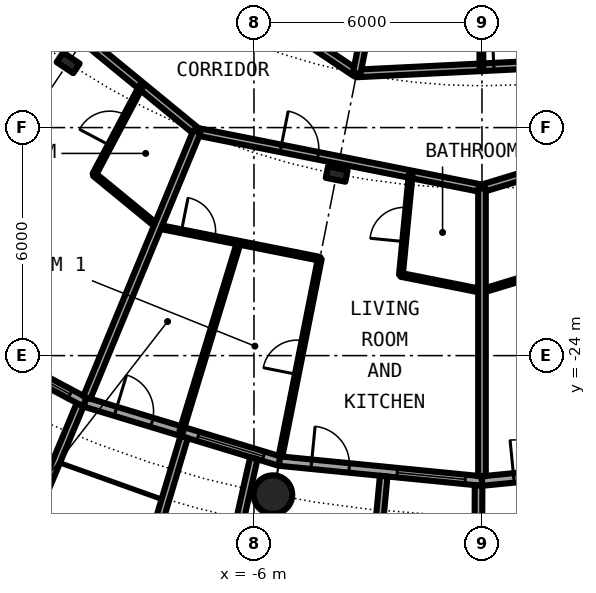
"""IFC4 building model, lengths in metres.
Left out: names, types, materials, properties, quantities, classifications, styles, units other than length and angle.
Written with IfcOpenShell. Run it as: python <this file> out.ifc"""

import sys

from ifc_helpers import new_model, si_unit, direction, frame, frame_2d, origin, origin_2d, place, context, subcontext, project, spatial, rectangle, hollow_circle, i_section, extrude, element, fill, save


model = new_model("IFC4")
c1 = context("Model", 3, precision=1e-05, world=origin(), true_north=direction((0.0, 1.0)))
c2 = subcontext(c1, "Body", "Model", "MODEL_VIEW")
j1 = project(units=[si_unit("LENGTHUNIT", "METRE"), si_unit("PLANEANGLEUNIT", "RADIAN")], contexts=[c1])
p1 = place(None, origin())
s1 = spatial("IfcSite", under=j1, at=p1, CompositionType="ELEMENT")
p2 = place(p1, origin())
s2 = spatial("IfcBuilding", under=s1, at=p2, CompositionType="ELEMENT")
p3 = place(p2, frame((0.0, 0.0, 88.0)))
s3 = spatial("IfcBuildingStorey", under=s2, at=p3, CompositionType="ELEMENT", Elevation=88.0)
p4 = place(p3, frame((-5.501, -27.658, 0.0), z_axis=(0.0, 0.0, 1.0), x_axis=(1.0, 0.0, 0.0)))
e1 = element("IfcColumn", 1, at=p4, inside=s3, PredefinedType="COLUMN", context=c2, shape_type="SweptSolid", body=[
    extrude(hollow_circle(Radius=0.508, WallThickness=0.04, at=origin_2d()), origin(), (0.0, 0.0, 1.0), 3.05),
])
for number, where, z_axis, x_axis in (
    (2, (-10.889, -16.297, 0.0), (0.0, 0.0, 1.0), (-0.556, -0.831, 0.0)),
    (3, (-3.824, -19.223, 0.0), (0.0, 0.0, 1.0), (-0.195, -0.981, 0.0)),
):
    element("IfcColumn", number, at=place(p3, frame(where, z_axis=z_axis, x_axis=x_axis)), inside=s3, PredefinedType="COLUMN", context=c2, shape_type="SweptSolid", body=[
        extrude(i_section(OverallWidth=0.306, OverallDepth=0.524, WebThickness=0.021, FlangeThickness=0.04, FilletRadius=0.027, at=origin_2d()), origin(), (0.0, 0.0, 1.0), 3.05),
    ])
p5 = place(p3, frame((-15.167, -22.699, 0.0), z_axis=(0.0, 0.0, 1.0), x_axis=(0.881915646801, -0.471407246368, 0.0)))
e4 = element("IfcWall", 4, at=p5, inside=s3, PredefinedType="SOLIDWALL", context=c2, shape_type="SweptSolid", body=[
    extrude(rectangle(XDim=5.352, YDim=0.25, at=frame_2d((2.676, 0.0))), origin(), (0.0, 0.0, 1.0), 2.7),
])
p6 = place(p5, frame((0.841, 0.0, 0.0)))
e5 = element("IfcOpeningElement", 5, at=p6, cuts=e4, PredefinedType="OPENING", context=c2, shape_type="SweptSolid", body=[
    extrude(rectangle(XDim=1.0, YDim=2.2, at=frame_2d((0.5, 1.1))), frame((0.0, 0.135, 0.0), z_axis=(0.0, -1.0, 0.0), x_axis=(1.0, 0.0, 0.0)), (0.0, 0.0, 1.0), 0.27),
])
p7 = place(p5, frame((3.111, 0.0, 0.3)))
e6 = element("IfcOpeningElement", 6, at=p7, cuts=e4, PredefinedType="OPENING", context=c2, shape_type="SweptSolid", body=[
    extrude(rectangle(XDim=1.8, YDim=2.1, at=frame_2d((0.9, 1.05))), frame((0.0, 0.135, 0.0), z_axis=(0.0, -1.0, 0.0), x_axis=(1.0, 0.0, 0.0)), (0.0, 0.0, 1.0), 0.27),
])
p8 = place(p3, frame((-10.575, -25.295, -0.03), z_axis=(0.0, 0.0, 1.0), x_axis=(-0.385697364644, -0.922625353492, 0.0)))
e7 = element("IfcWall", 7, at=p8, inside=s3, PredefinedType="SOLIDWALL", context=c2, shape_type="SweptSolid", body=[
    extrude(rectangle(XDim=2.883, YDim=0.2, at=frame_2d((1.442, 0.0))), origin(), (0.0, 0.0, 1.0), 2.73),
])
p9 = place(p3, frame((-10.447, -25.222, 0.0), z_axis=(0.0, 0.0, 1.0), x_axis=(0.956965678721, -0.290201119486, 0.0)))
e8 = element("IfcWall", 8, at=p9, inside=s3, PredefinedType="SOLIDWALL", context=c2, shape_type="SweptSolid", body=[
    extrude(rectangle(XDim=5.351, YDim=0.25, at=frame_2d((2.676, 0.0))), origin(), (0.0, 0.0, 1.0), 2.7),
])
p10 = place(p9, frame((0.841, 0.0, 0.0)))
e9 = element("IfcOpeningElement", 9, at=p10, cuts=e8, PredefinedType="OPENING", context=c2, shape_type="SweptSolid", body=[
    extrude(rectangle(XDim=1.0, YDim=2.2, at=frame_2d((0.5, 1.1))), frame((0.0, 0.135, 0.0), z_axis=(0.0, -1.0, 0.0), x_axis=(1.0, 0.0, 0.0)), (0.0, 0.0, 1.0), 0.27),
])
p11 = place(p9, frame((3.111, 0.0, 0.3)))
e10 = element("IfcOpeningElement", 10, at=p11, cuts=e8, PredefinedType="OPENING", context=c2, shape_type="SweptSolid", body=[
    extrude(rectangle(XDim=1.8, YDim=2.1, at=frame_2d((0.9, 1.05))), frame((0.0, 0.135, 0.0), z_axis=(0.0, -1.0, 0.0), x_axis=(1.0, 0.0, 0.0)), (0.0, 0.0, 1.0), 0.27),
])
p12 = place(p3, frame((-7.837, -26.144, -0.03), z_axis=(0.0, 0.0, 1.0), x_axis=(-0.287064767992, -0.957911174889, 0.0)))
e11 = element("IfcWall", 11, at=p12, inside=s3, PredefinedType="SOLIDWALL", context=c2, shape_type="SweptSolid", body=[
    extrude(rectangle(XDim=3.006, YDim=0.2, at=frame_2d((1.503, 0.0))), origin(), (0.0, 0.0, 1.0), 2.73),
])
p13 = place(p3, frame((-6.004, -26.7, -0.03), z_axis=(0.0, 0.0, 1.0), x_axis=(-0.219609259383, -0.975587911566, 0.0)))
e12 = element("IfcWall", 12, at=p13, inside=s3, PredefinedType="SOLIDWALL", context=c2, shape_type="SweptSolid", body=[
    extrude(rectangle(XDim=2.933, YDim=0.2, at=frame_2d((1.466, 0.0))), origin(), (0.0, 0.0, 1.0), 2.73),
])
p14 = place(p3, frame((-5.326, -26.775, 0.0), z_axis=(0.0, 0.0, 1.0), x_axis=(0.995173996315, -0.098126026407, 0.0)))
e13 = element("IfcWall", 13, at=p14, inside=s3, PredefinedType="SOLIDWALL", context=c2, shape_type="SweptSolid", body=[
    extrude(rectangle(XDim=5.352, YDim=0.25, at=frame_2d((2.676, 0.0))), origin(), (0.0, 0.0, 1.0), 2.7),
])
p15 = place(p14, frame((0.841, 0.0, 0.0)))
e14 = element("IfcOpeningElement", 14, at=p15, cuts=e13, PredefinedType="OPENING", context=c2, shape_type="SweptSolid", body=[
    extrude(rectangle(XDim=1.0, YDim=2.2, at=frame_2d((0.5, 1.1))), frame((0.0, 0.135, 0.0), z_axis=(0.0, -1.0, 0.0), x_axis=(1.0, 0.0, 0.0)), (0.0, 0.0, 1.0), 0.27),
])
p16 = place(p14, frame((3.111, 0.0, 0.3)))
e15 = element("IfcOpeningElement", 15, at=p16, cuts=e13, PredefinedType="OPENING", context=c2, shape_type="SweptSolid", body=[
    extrude(rectangle(XDim=1.8, YDim=2.1, at=frame_2d((0.9, 1.05))), frame((0.0, 0.135, 0.0), z_axis=(0.0, -1.0, 0.0), x_axis=(1.0, 0.0, 0.0)), (0.0, 0.0, 1.0), 0.27),
])
p17 = place(p3, frame((-2.586, -27.171, -0.03), z_axis=(0.0, 0.0, 1.0), x_axis=(-0.094548432284, -0.995520262954, 0.0)))
e16 = element("IfcWall", 16, at=p17, inside=s3, PredefinedType="SOLIDWALL", context=c2, shape_type="SweptSolid", body=[
    extrude(rectangle(XDim=3.006, YDim=0.2, at=frame_2d((1.503, 0.0))), origin(), (0.0, 0.0, 1.0), 2.73),
])
p18 = place(p3, frame((-0.09, -27.417, -0.03), z_axis=(0.0, 0.0, 1.0), x_axis=(-0.00347308367, -0.999993968827, 0.0)))
e17 = element("IfcWall", 17, at=p18, inside=s3, PredefinedType="SOLIDWALL", context=c2, shape_type="SweptSolid", body=[
    extrude(rectangle(XDim=2.882, YDim=0.2, at=frame_2d((1.441, 0.0))), origin(), (0.0, 0.0, 1.0), 2.73),
])
p19 = place(p3, frame((0.0, -27.3, 0.0), z_axis=(0.0, 0.0, 1.0), x_axis=(0.995173996315, 0.098126026407, 0.0)))
e18 = element("IfcWall", 18, at=p19, inside=s3, PredefinedType="SOLIDWALL", context=c2, shape_type="SweptSolid", body=[
    extrude(rectangle(XDim=5.352, YDim=0.25, at=frame_2d((2.676, 0.0))), origin(), (0.0, 0.0, 1.0), 2.7),
])
p20 = place(p19, frame((0.841, 0.0, 0.0)))
e19 = element("IfcOpeningElement", 19, at=p20, cuts=e18, PredefinedType="OPENING", context=c2, shape_type="SweptSolid", body=[
    extrude(rectangle(XDim=1.0, YDim=2.2, at=frame_2d((0.5, 1.1))), frame((0.0, 0.135, 0.0), z_axis=(0.0, -1.0, 0.0), x_axis=(1.0, 0.0, 0.0)), (0.0, 0.0, 1.0), 0.27),
])
p21 = place(p19, frame((3.111, 0.0, 0.3)))
e20 = element("IfcOpeningElement", 20, at=p21, cuts=e18, PredefinedType="OPENING", context=c2, shape_type="SweptSolid", body=[
    extrude(rectangle(XDim=1.8, YDim=2.1, at=frame_2d((0.9, 1.05))), frame((0.0, 0.135, 0.0), z_axis=(0.0, -1.0, 0.0), x_axis=(1.0, 0.0, 0.0)), (0.0, 0.0, 1.0), 0.27),
])
p22 = place(p3, frame((-8.536, -20.603, 0.0), z_axis=(0.0, 0.0, 1.0), x_axis=(0.980795826794, -0.195037294239, 0.0)))
e21 = element("IfcWall", 21, at=p22, inside=s3, PredefinedType="PARTITIONING", context=c2, shape_type="SweptSolid", body=[
    extrude(rectangle(XDim=4.352, YDim=0.1, at=frame_2d((2.176, 0.0))), origin(), (0.0, 0.0, 1.0), 2.7),
])
p23 = place(p22, frame((0.639, 0.0, 0.0)))
e22 = element("IfcOpeningElement", 22, at=p23, cuts=e21, PredefinedType="OPENING", context=c2, shape_type="SweptSolid", body=[
    extrude(rectangle(XDim=0.9, YDim=2.3, at=frame_2d((0.45, 1.15))), frame((0.0, 0.06, 0.0), z_axis=(0.0, -1.0, 0.0), x_axis=(1.0, 0.0, 0.0)), (0.0, 0.0, 1.0), 0.12),
])
p24 = place(p3, frame((-2.133, -21.876, 0.0), z_axis=(0.0, 0.0, 1.0), x_axis=(0.980804550577, -0.194993419292, 0.0)))
e23 = element("IfcWall", 23, at=p24, inside=s3, PredefinedType="PARTITIONING", context=c2, shape_type="SweptSolid", body=[
    extrude(rectangle(XDim=2.175, YDim=0.1, at=frame_2d((1.087, 0.0))), origin(), (0.0, 0.0, 1.0), 2.7),
])
p25 = place(p3, frame((-10.202, -19.234, 0.0), z_axis=(0.0, 0.0, 1.0), x_axis=(0.772948171844, -0.634469166818, 0.0)))
e24 = element("IfcWall", 24, at=p25, inside=s3, PredefinedType="PARTITIONING", context=c2, shape_type="SweptSolid", body=[
    extrude(rectangle(XDim=2.158, YDim=0.1, at=frame_2d((1.079, 0.0))), origin(), (0.0, 0.0, 1.0), 2.7),
])
p26 = place(p3, frame((0.0, -22.3, 0.0), z_axis=(0.0, 0.0, 1.0), x_axis=(0.956940987612, 0.290282528286, 0.0)))
e25 = element("IfcWall", 25, at=p26, inside=s3, PredefinedType="PARTITIONING", context=c2, shape_type="SweptSolid", body=[
    extrude(rectangle(XDim=6.477, YDim=0.1, at=frame_2d((3.238, 0.0))), origin(), (0.0, 0.0, 1.0), 2.7),
])
p27 = place(p3, frame((-7.501, -18.108, 0.0), z_axis=(0.0, 0.0, 1.0), x_axis=(0.980781515054, -0.195109250749, 0.0)))
e26 = element("IfcWall", 26, at=p27, inside=s3, PredefinedType="PARTITIONING", context=c2, shape_type="SweptSolid", body=[
    extrude(rectangle(XDim=7.648, YDim=0.2, at=frame_2d((3.824, 0.0))), origin(), (0.0, 0.0, 1.0), 2.38),
])
p28 = place(p27, frame((2.25, 0.0, 0.0)))
e27 = element("IfcOpeningElement", 27, at=p28, cuts=e26, PredefinedType="OPENING", context=c2, shape_type="SweptSolid", body=[
    extrude(rectangle(XDim=1.0, YDim=2.3, at=frame_2d((0.5, 1.15))), frame((0.0, 0.11, 0.0), z_axis=(0.0, -1.0, 0.0), x_axis=(1.0, 0.0, 0.0)), (0.0, 0.0, 1.0), 0.22),
])
p29 = place(p3, frame((-16.173, -10.991, 0.0), z_axis=(0.0, 0.0, 1.0), x_axis=(0.773013989296, -0.634388975591, 0.0)))
e28 = element("IfcWall", 28, at=p29, inside=s3, PredefinedType="PARTITIONING", context=c2, shape_type="SweptSolid", body=[
    extrude(rectangle(XDim=11.219, YDim=0.2, at=frame_2d((5.609, 0.0))), origin(), (0.0, 0.0, 1.0), 2.38),
])
p30 = place(p29, frame((6.278, 0.0, 0.0)))
e29 = element("IfcOpeningElement", 29, at=p30, cuts=e28, PredefinedType="OPENING", context=c2, shape_type="SweptSolid", body=[
    extrude(rectangle(XDim=1.0, YDim=2.3, at=frame_2d((0.5, 1.15))), frame((0.0, 0.11, 0.0), z_axis=(0.0, -1.0, 0.0), x_axis=(1.0, 0.0, 0.0)), (0.0, 0.0, 1.0), 0.22),
])
p31 = place(p3, frame((0.0, -19.6, 0.0), z_axis=(0.0, 0.0, 1.0), x_axis=(0.956932298225, 0.290311172044, 0.0)))
e30 = element("IfcWall", 30, at=p31, inside=s3, PredefinedType="PARTITIONING", context=c2, shape_type="SweptSolid", body=[
    extrude(rectangle(XDim=11.219, YDim=0.2, at=frame_2d((5.61, 0.0))), origin(), (0.0, 0.0, 1.0), 2.38),
])
p32 = place(p31, frame((7.086, 0.0, 0.0)))
e31 = element("IfcOpeningElement", 31, at=p32, cuts=e30, PredefinedType="OPENING", context=c2, shape_type="SweptSolid", body=[
    extrude(rectangle(XDim=1.0, YDim=2.3, at=frame_2d((0.5, 1.15))), frame((0.0, 0.11, 0.0), z_axis=(0.0, -1.0, 0.0), x_axis=(1.0, 0.0, 0.0)), (0.0, 0.0, 1.0), 0.22),
])
p33 = place(p3, frame((-3.297, -16.575, 0.0), z_axis=(0.0, 0.0, 1.0), x_axis=(0.998796706656, 0.0490422142, 0.0)))
e32 = element("IfcWall", 32, at=p33, inside=s3, PredefinedType="PARTITIONING", context=c2, shape_type="SweptSolid", body=[
    extrude(rectangle(XDim=8.214, YDim=0.2, at=frame_2d((4.107, 0.0))), origin(), (0.0, 0.0, 1.0), 2.7),
])
p34 = place(p33, frame((3.614, 0.0, 0.0)))
e33 = element("IfcOpeningElement", 33, at=p34, cuts=e32, PredefinedType="OPENING", context=c2, shape_type="SweptSolid", body=[
    extrude(rectangle(XDim=1.0, YDim=2.3, at=frame_2d((0.5, 1.15))), frame((0.0, 0.11, 0.0), z_axis=(0.0, -1.0, 0.0), x_axis=(1.0, 0.0, 0.0)), (0.0, 0.0, 1.0), 0.22),
])
p35 = place(p3, frame((-12.706, -10.291, 0.0), z_axis=(0.0, 0.0, 1.0), x_axis=(0.831588572532, -0.555392155178, 0.0)))
e34 = element("IfcWall", 34, at=p35, inside=s3, PredefinedType="PARTITIONING", context=c2, shape_type="SweptSolid", body=[
    extrude(rectangle(XDim=11.314, YDim=0.2, at=frame_2d((5.657, 0.0))), origin(), (0.0, 0.0, 1.0), 2.7),
])
p36 = place(p35, frame((5.966, 0.0, 0.0)))
e35 = element("IfcOpeningElement", 35, at=p36, cuts=e34, PredefinedType="OPENING", context=c2, shape_type="SweptSolid", body=[
    extrude(rectangle(XDim=1.0, YDim=2.3, at=frame_2d((0.5, 1.15))), frame((0.0, 0.11, 0.0), z_axis=(0.0, -1.0, 0.0), x_axis=(1.0, 0.0, 0.0)), (0.0, 0.0, 1.0), 0.22),
])
p37 = place(p3, frame((-10.399, -25.106, 0.0), z_axis=(0.0, 0.0, 1.0), x_axis=(0.382600411313, 0.923913916587, 0.0)))
e36 = element("IfcWall", 36, at=p37, inside=s3, PredefinedType="PARTITIONING", context=c2, shape_type="SweptSolid", body=[
    extrude(rectangle(XDim=7.574, YDim=0.2, at=frame_2d((3.787, 0.0))), origin(), (0.0, 0.0, 1.0), 2.7),
])
p38 = place(p3, frame((-10.202, -19.234, 0.0), z_axis=(0.0, 0.0, 1.0), x_axis=(0.468462103808, 0.883483591979, 0.0)))
e37 = element("IfcWall", 37, at=p38, inside=s3, PredefinedType="PARTITIONING", context=c2, shape_type="SweptSolid", body=[
    extrude(rectangle(XDim=2.636, YDim=0.1, at=frame_2d((1.318, 0.0))), origin(), (0.0, 0.0, 1.0), 2.7),
])
p39 = place(p38, frame((0.868, 0.0, 0.0)))
e38 = element("IfcOpeningElement", 38, at=p39, cuts=e37, PredefinedType="OPENING", context=c2, shape_type="SweptSolid", body=[
    extrude(rectangle(XDim=0.9, YDim=2.3, at=frame_2d((0.45, 1.15))), frame((0.0, 0.06, 0.0), z_axis=(0.0, -1.0, 0.0), x_axis=(1.0, 0.0, 0.0)), (0.0, 0.0, 1.0), 0.12),
])
p40 = place(p3, frame((-7.913, -25.997, 0.0), z_axis=(0.0, 0.0, 1.0), x_axis=(0.291264462755, 0.956642573136, 0.0)))
e39 = element("IfcWall", 39, at=p40, inside=s3, PredefinedType="PARTITIONING", context=c2, shape_type="SweptSolid", body=[
    extrude(rectangle(XDim=5.195, YDim=0.1, at=frame_2d((2.598, 0.0))), origin(), (0.0, 0.0, 1.0), 2.7),
])
p41 = place(p3, frame((-5.302, -26.653, 0.0), z_axis=(0.0, 0.0, 1.0), x_axis=(0.195115793364, 0.980780213493, 0.0)))
e40 = element("IfcWall", 40, at=p41, inside=s3, PredefinedType="PARTITIONING", context=c2, shape_type="SweptSolid", body=[
    extrude(rectangle(XDim=5.304, YDim=0.1, at=frame_2d((2.652, 0.0))), origin(), (0.0, 0.0, 1.0), 2.7),
])
p42 = place(p41, frame((2.202, 0.0, 0.0)))
e41 = element("IfcOpeningElement", 41, at=p42, cuts=e40, PredefinedType="OPENING", context=c2, shape_type="SweptSolid", body=[
    extrude(rectangle(XDim=0.9, YDim=2.3, at=frame_2d((0.45, 1.15))), frame((0.0, 0.06, 0.0), z_axis=(0.0, -1.0, 0.0), x_axis=(1.0, 0.0, 0.0)), (0.0, 0.0, 1.0), 0.12),
])
p43 = place(p3, frame((-3.297, -16.575, 0.0), z_axis=(0.0, 0.0, 1.0), x_axis=(0.19511354088, 0.980780661598, 0.0)))
e42 = element("IfcWall", 42, at=p43, inside=s3, PredefinedType="PARTITIONING", context=c2, shape_type="SweptSolid", body=[
    extrude(rectangle(XDim=9.179, YDim=0.2, at=frame_2d((4.59, 0.0))), origin(), (0.0, 0.0, 1.0), 2.7),
])
p44 = place(p3, frame((-2.133, -21.876, 0.0), z_axis=(0.0, 0.0, 1.0), x_axis=(0.096960338807, 0.995288246036, 0.0)))
e43 = element("IfcWall", 43, at=p44, inside=s3, PredefinedType="PARTITIONING", context=c2, shape_type="SweptSolid", body=[
    extrude(rectangle(XDim=2.661, YDim=0.1, at=frame_2d((1.331, 0.0))), origin(), (0.0, 0.0, 1.0), 2.7),
])
p45 = place(p44, frame((0.881, 0.0, 0.0)))
e44 = element("IfcOpeningElement", 44, at=p45, cuts=e43, PredefinedType="OPENING", context=c2, shape_type="SweptSolid", body=[
    extrude(rectangle(XDim=0.9, YDim=2.3, at=frame_2d((0.45, 1.15))), frame((0.0, 0.06, 0.0), z_axis=(0.0, -1.0, 0.0), x_axis=(1.0, 0.0, 0.0)), (0.0, 0.0, 1.0), 0.12),
])
p46 = place(p3, frame((-0.016, -16.414, 0.0), z_axis=(0.0, 0.0, 1.0), x_axis=(0.001210427419, 0.999999267432, 0.0)))
e45 = element("IfcWall", 45, at=p46, inside=s3, PredefinedType="PARTITIONING", context=c2, shape_type="SweptSolid", body=[
    extrude(rectangle(XDim=2.622, YDim=0.1, at=frame_2d((1.311, 0.0))), origin(), (0.0, 0.0, 1.0), 2.7),
])
p47 = place(p3, frame((0.0, -27.175, 0.0), z_axis=(0.0, 0.0, 1.0), x_axis=(0.0, 1.0, 0.0)))
e46 = element("IfcWall", 46, at=p47, inside=s3, PredefinedType="PARTITIONING", context=c2, shape_type="SweptSolid", body=[
    extrude(rectangle(XDim=7.575, YDim=0.2, at=frame_2d((3.788, 0.0))), origin(), (0.0, 0.0, 1.0), 2.7),
])
p48 = place(p7, origin())
e47 = element("IfcWindow", 47, at=p48, inside=s3, PartitioningType="SINGLE_PANEL", PredefinedType="WINDOW", context=c2, shape_type="SweptSolid", body=[
    extrude(rectangle(XDim=1.8, YDim=2.1, at=frame_2d((0.9, 1.05))), frame((0.0, 0.03, 0.0), z_axis=(0.0, -1.0, 0.0), x_axis=(1.0, 0.0, 0.0)), (0.0, 0.0, 1.0), 0.06),
])
fill(e6, e47)
p49 = place(p10, origin())
e48 = element("IfcDoor", 48, at=p49, inside=s3, OperationType="SINGLE_SWING_LEFT", PredefinedType="DOOR", context=c2, shape_type="SweptSolid", body=[
    extrude(rectangle(XDim=1.0, YDim=2.2, at=frame_2d((0.5, 1.1))), frame((0.0, 0.025, 0.0), z_axis=(0.0, -1.0, 0.0), x_axis=(1.0, 0.0, 0.0)), (0.0, 0.0, 1.0), 0.05),
])
fill(e9, e48)
p50 = place(p11, origin())
e49 = element("IfcWindow", 49, at=p50, inside=s3, PartitioningType="SINGLE_PANEL", PredefinedType="WINDOW", context=c2, shape_type="SweptSolid", body=[
    extrude(rectangle(XDim=1.8, YDim=2.1, at=frame_2d((0.9, 1.05))), frame((0.0, 0.03, 0.0), z_axis=(0.0, -1.0, 0.0), x_axis=(1.0, 0.0, 0.0)), (0.0, 0.0, 1.0), 0.06),
])
fill(e10, e49)
p51 = place(p15, origin())
e50 = element("IfcDoor", 50, at=p51, inside=s3, OperationType="SINGLE_SWING_LEFT", PredefinedType="DOOR", context=c2, shape_type="SweptSolid", body=[
    extrude(rectangle(XDim=1.0, YDim=2.2, at=frame_2d((0.5, 1.1))), frame((0.0, 0.025, 0.0), z_axis=(0.0, -1.0, 0.0), x_axis=(1.0, 0.0, 0.0)), (0.0, 0.0, 1.0), 0.05),
])
fill(e14, e50)
p52 = place(p16, origin())
e51 = element("IfcWindow", 51, at=p52, inside=s3, PartitioningType="SINGLE_PANEL", PredefinedType="WINDOW", context=c2, shape_type="SweptSolid", body=[
    extrude(rectangle(XDim=1.8, YDim=2.1, at=frame_2d((0.9, 1.05))), frame((0.0, 0.03, 0.0), z_axis=(0.0, -1.0, 0.0), x_axis=(1.0, 0.0, 0.0)), (0.0, 0.0, 1.0), 0.06),
])
fill(e15, e51)
p53 = place(p20, origin())
e52 = element("IfcDoor", 52, at=p53, inside=s3, OperationType="SINGLE_SWING_LEFT", PredefinedType="DOOR", context=c2, shape_type="SweptSolid", body=[
    extrude(rectangle(XDim=1.0, YDim=2.2, at=frame_2d((0.5, 1.1))), frame((0.0, 0.025, 0.0), z_axis=(0.0, -1.0, 0.0), x_axis=(1.0, 0.0, 0.0)), (0.0, 0.0, 1.0), 0.05),
])
fill(e19, e52)
p54 = place(p39, origin())
e53 = element("IfcDoor", 53, at=p54, inside=s3, OperationType="SINGLE_SWING_RIGHT", PredefinedType="DOOR", context=c2, shape_type="SweptSolid", body=[
    extrude(rectangle(XDim=0.9, YDim=2.3, at=frame_2d((0.45, 1.15))), frame((0.0, 0.025, 0.0), z_axis=(0.0, -1.0, 0.0), x_axis=(1.0, 0.0, 0.0)), (0.0, 0.0, 1.0), 0.05),
])
fill(e38, e53)
p55 = place(p28, origin())
e54 = element("IfcDoor", 54, at=p55, inside=s3, OperationType="SINGLE_SWING_LEFT", PredefinedType="DOOR", context=c2, shape_type="SweptSolid", body=[
    extrude(rectangle(XDim=1.0, YDim=2.3, at=frame_2d((0.5, 1.15))), frame((0.0, 0.025, 0.0), z_axis=(0.0, -1.0, 0.0), x_axis=(1.0, 0.0, 0.0)), (0.0, 0.0, 1.0), 0.05),
])
fill(e27, e54)
p56 = place(p45, origin())
e55 = element("IfcDoor", 55, at=p56, inside=s3, OperationType="SINGLE_SWING_LEFT", PredefinedType="DOOR", context=c2, shape_type="SweptSolid", body=[
    extrude(rectangle(XDim=0.9, YDim=2.3, at=frame_2d((0.45, 1.15))), frame((0.0, 0.025, 0.0), z_axis=(0.0, -1.0, 0.0), x_axis=(1.0, 0.0, 0.0)), (0.0, 0.0, 1.0), 0.05),
])
fill(e44, e55)
p57 = place(p42, origin())
e56 = element("IfcDoor", 56, at=p57, inside=s3, OperationType="SINGLE_SWING_LEFT", PredefinedType="DOOR", context=c2, shape_type="SweptSolid", body=[
    extrude(rectangle(XDim=0.9, YDim=2.3, at=frame_2d((0.45, 1.15))), frame((0.0, 0.025, 0.0), z_axis=(0.0, -1.0, 0.0), x_axis=(1.0, 0.0, 0.0)), (0.0, 0.0, 1.0), 0.05),
])
fill(e41, e56)
p58 = place(p23, origin())
e57 = element("IfcDoor", 57, at=p58, inside=s3, OperationType="SINGLE_SWING_LEFT", PredefinedType="DOOR", context=c2, shape_type="SweptSolid", body=[
    extrude(rectangle(XDim=0.9, YDim=2.3, at=frame_2d((0.45, 1.15))), frame((0.0, 0.025, 0.0), z_axis=(0.0, -1.0, 0.0), x_axis=(1.0, 0.0, 0.0)), (0.0, 0.0, 1.0), 0.05),
])
fill(e22, e57)
p59 = place(p34, origin())
e58 = element("IfcDoor", 58, at=p59, inside=s3, OperationType="SINGLE_SWING_RIGHT", PredefinedType="DOOR", context=c2, shape_type="SweptSolid", body=[
    extrude(rectangle(XDim=1.0, YDim=2.3, at=frame_2d((0.5, 1.15))), frame((0.0, 0.025, 0.0), z_axis=(0.0, -1.0, 0.0), x_axis=(1.0, 0.0, 0.0)), (0.0, 0.0, 1.0), 0.05),
])
fill(e33, e58)
save(model, sys.argv[1])
